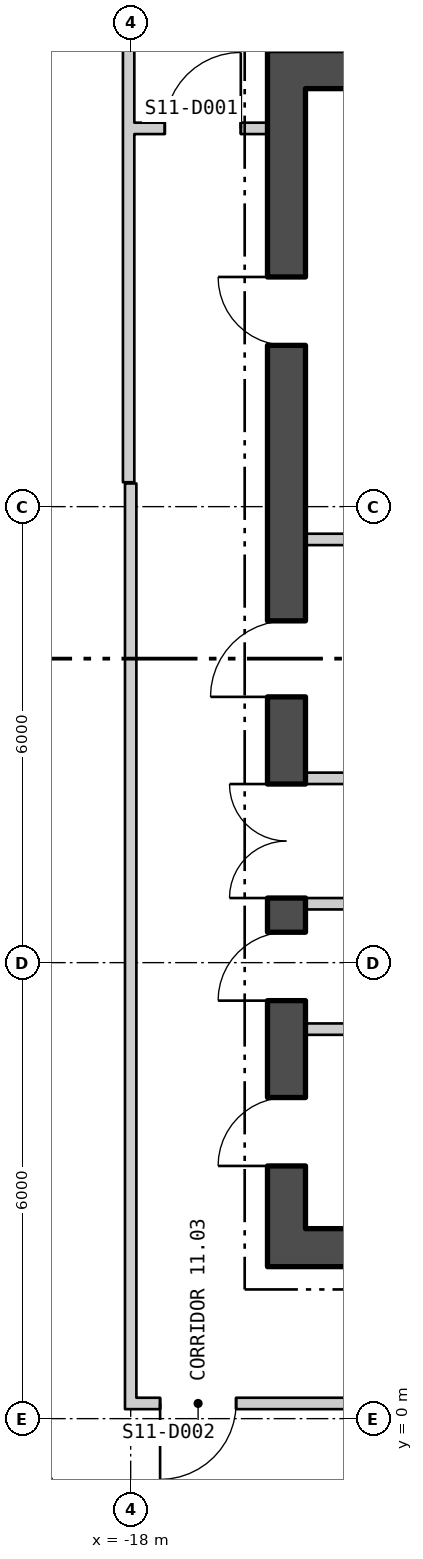
"""IFC4 building model, lengths in metres.
Left out: names, types, materials, properties, quantities, classifications, styles, units other than length and angle.
Written with IfcOpenShell. Run it as: python <this file> out.ifc"""

import sys

from ifc_helpers import new_model, si_unit, direction, frame, frame_2d, origin, place, context, subcontext, project, spatial, polyline, rectangle, outline, extrude, element, fill, save


model = new_model("IFC4")
c1 = context("Model", 3, precision=1e-05, world=origin(), true_north=direction((0.0, 1.0)))
c2 = subcontext(c1, "Body", "Model", "MODEL_VIEW")
j1 = project(units=[si_unit("LENGTHUNIT", "METRE"), si_unit("PLANEANGLEUNIT", "RADIAN")], contexts=[c1])
p1 = place(None, origin())
s1 = spatial("IfcSite", under=j1, at=p1, CompositionType="ELEMENT")
p2 = place(p1, origin())
s2 = spatial("IfcBuilding", under=s1, at=p2, CompositionType="ELEMENT")
p3 = place(p2, frame((0.0, 0.0, 151.5)))
s3 = spatial("IfcBuildingStorey", under=s2, at=p3, CompositionType="ELEMENT", Elevation=151.5)
p4 = place(p3, frame((-27.075, 12.683, -0.18), z_axis=(0.0, 0.0, 1.0), x_axis=(0.500000141277, -0.866025322218, 0.0)))
e1 = element("IfcWall", 1, at=p4, inside=s3, PredefinedType="SOLIDWALL", context=c2, shape_type="SweptSolid", body=[
    extrude(outline(polyline([(-0.13, -0.225), (45.86, -0.225), (45.6, 0.225), (0.13, 0.225), (-0.13, -0.225)])), origin(), (0.0, 0.0, 1.0), 3.68),
])
p5 = place(p4, frame((1.424, 0.0, 1.08)))
e2 = element("IfcOpeningElement", 2, at=p5, cuts=e1, PredefinedType="OPENING", context=c2, shape_type="SweptSolid", body=[
    extrude(rectangle(XDim=2.4, YDim=2.0, at=frame_2d((1.2, 1.0))), frame((0.0, 0.235, 0.0), z_axis=(0.0, -1.0, 0.0), x_axis=(1.0, 0.0, 0.0)), (0.0, 0.0, 1.0), 0.47),
])
p6 = place(p4, frame((5.892, 0.0, 1.08)))
e3 = element("IfcOpeningElement", 3, at=p6, cuts=e1, PredefinedType="OPENING", context=c2, shape_type="SweptSolid", body=[
    extrude(rectangle(XDim=2.4, YDim=2.0, at=frame_2d((1.2, 1.0))), frame((0.0, 0.235, 0.0), z_axis=(0.0, -1.0, 0.0), x_axis=(1.0, 0.0, 0.0)), (0.0, 0.0, 1.0), 0.47),
])
p7 = place(p4, frame((10.399, 0.0, 1.08)))
e4 = element("IfcOpeningElement", 4, at=p7, cuts=e1, PredefinedType="OPENING", context=c2, shape_type="SweptSolid", body=[
    extrude(rectangle(XDim=2.4, YDim=2.0, at=frame_2d((1.2, 1.0))), frame((0.0, 0.235, 0.0), z_axis=(0.0, -1.0, 0.0), x_axis=(1.0, 0.0, 0.0)), (0.0, 0.0, 1.0), 0.47),
])
p8 = place(p4, frame((14.905, 0.0, 1.08)))
e5 = element("IfcOpeningElement", 5, at=p8, cuts=e1, PredefinedType="OPENING", context=c2, shape_type="SweptSolid", body=[
    extrude(rectangle(XDim=2.4, YDim=2.0, at=frame_2d((1.2, 1.0))), frame((0.0, 0.235, 0.0), z_axis=(0.0, -1.0, 0.0), x_axis=(1.0, 0.0, 0.0)), (0.0, 0.0, 1.0), 0.47),
])
p9 = place(p4, frame((19.412, 0.0, 1.08)))
e6 = element("IfcOpeningElement", 6, at=p9, cuts=e1, PredefinedType="OPENING", context=c2, shape_type="SweptSolid", body=[
    extrude(rectangle(XDim=2.4, YDim=2.0, at=frame_2d((1.2, 1.0))), frame((0.0, 0.235, 0.0), z_axis=(0.0, -1.0, 0.0), x_axis=(1.0, 0.0, 0.0)), (0.0, 0.0, 1.0), 0.47),
])
p10 = place(p4, frame((23.918, 0.0, 1.08)))
e7 = element("IfcOpeningElement", 7, at=p10, cuts=e1, PredefinedType="OPENING", context=c2, shape_type="SweptSolid", body=[
    extrude(rectangle(XDim=2.4, YDim=2.0, at=frame_2d((1.2, 1.0))), frame((0.0, 0.235, 0.0), z_axis=(0.0, -1.0, 0.0), x_axis=(1.0, 0.0, 0.0)), (0.0, 0.0, 1.0), 0.47),
])
p11 = place(p4, frame((28.425, 0.0, 1.08)))
e8 = element("IfcOpeningElement", 8, at=p11, cuts=e1, PredefinedType="OPENING", context=c2, shape_type="SweptSolid", body=[
    extrude(rectangle(XDim=2.4, YDim=2.0, at=frame_2d((1.2, 1.0))), frame((0.0, 0.235, 0.0), z_axis=(0.0, -1.0, 0.0), x_axis=(1.0, 0.0, 0.0)), (0.0, 0.0, 1.0), 0.47),
])
p12 = place(p4, frame((32.932, 0.0, 1.08)))
e9 = element("IfcOpeningElement", 9, at=p12, cuts=e1, PredefinedType="OPENING", context=c2, shape_type="SweptSolid", body=[
    extrude(rectangle(XDim=2.4, YDim=2.0, at=frame_2d((1.2, 1.0))), frame((0.0, 0.235, 0.0), z_axis=(0.0, -1.0, 0.0), x_axis=(1.0, 0.0, 0.0)), (0.0, 0.0, 1.0), 0.47),
])
p13 = place(p4, frame((37.438, 0.0, 1.08)))
e10 = element("IfcOpeningElement", 10, at=p13, cuts=e1, PredefinedType="OPENING", context=c2, shape_type="SweptSolid", body=[
    extrude(rectangle(XDim=2.4, YDim=2.0, at=frame_2d((1.2, 1.0))), frame((0.0, 0.235, 0.0), z_axis=(0.0, -1.0, 0.0), x_axis=(1.0, 0.0, 0.0)), (0.0, 0.0, 1.0), 0.47),
])
p14 = place(p4, frame((41.907, 0.0, 1.08)))
e11 = element("IfcOpeningElement", 11, at=p14, cuts=e1, PredefinedType="OPENING", context=c2, shape_type="SweptSolid", body=[
    extrude(rectangle(XDim=2.4, YDim=2.0, at=frame_2d((1.2, 1.0))), frame((0.0, 0.235, 0.0), z_axis=(0.0, -1.0, 0.0), x_axis=(1.0, 0.0, 0.0)), (0.0, 0.0, 1.0), 0.47),
])
p15 = place(p3, frame((-16.2, 2.25, 0.0), z_axis=(0.0, 0.0, 1.0), x_axis=(1.0, 0.0, 0.0)))
e12 = element("IfcWall", 12, at=p15, inside=s3, PredefinedType="SHEAR", context=c2, shape_type="SweptSolid", body=[
    extrude(rectangle(XDim=32.4, YDim=0.5, at=frame_2d((16.2, 0.0))), origin(), (0.0, 0.0, 1.0), 3.7),
])
p16 = place(p15, frame((10.7, 0.0, 0.0)))
e13 = element("IfcOpeningElement", 13, at=p16, cuts=e12, PredefinedType="OPENING", context=c2, shape_type="SweptSolid", body=[
    extrude(rectangle(XDim=1.8, YDim=2.4, at=frame_2d((0.9, 1.2))), frame((0.0, 0.26, 0.0), z_axis=(0.0, -1.0, 0.0), x_axis=(1.0, 0.0, 0.0)), (0.0, 0.0, 1.0), 0.52),
])
p17 = place(p15, frame((20.7, 0.0, 0.0)))
e14 = element("IfcOpeningElement", 14, at=p17, cuts=e12, PredefinedType="OPENING", context=c2, shape_type="SweptSolid", body=[
    extrude(rectangle(XDim=1.8, YDim=2.4, at=frame_2d((0.9, 1.2))), frame((0.0, 0.26, 0.0), z_axis=(0.0, -1.0, 0.0), x_axis=(1.0, 0.0, 0.0)), (0.0, 0.0, 1.0), 0.52),
])
p18 = place(p3, frame((-16.2, 17.75, 0.0), z_axis=(0.0, 0.0, 1.0), x_axis=(1.0, 0.0, 0.0)))
e15 = element("IfcWall", 15, at=p18, inside=s3, PredefinedType="SHEAR", context=c2, shape_type="SweptSolid", body=[
    extrude(rectangle(XDim=32.4, YDim=0.5, at=frame_2d((16.2, 0.0))), origin(), (0.0, 0.0, 1.0), 3.7),
])
p19 = place(p3, frame((-15.95, 2.5, 0.0), z_axis=(0.0, 0.0, 1.0), x_axis=(0.0, 1.0, 0.0)))
e16 = element("IfcWall", 16, at=p19, inside=s3, PredefinedType="SHEAR", context=c2, shape_type="SweptSolid", body=[
    extrude(rectangle(XDim=15.0, YDim=0.5, at=frame_2d((7.5, 0.0))), origin(), (0.0, 0.0, 1.0), 3.7),
])
p20 = place(p19, frame((4.35, 0.0, 0.0)))
e17 = element("IfcOpeningElement", 17, at=p20, cuts=e16, PredefinedType="OPENING", context=c2, shape_type="SweptSolid", body=[
    extrude(rectangle(XDim=1.5, YDim=2.1, at=frame_2d((0.75, 1.05))), frame((0.0, 0.26, 0.0), z_axis=(0.0, -1.0, 0.0), x_axis=(1.0, 0.0, 0.0)), (0.0, 0.0, 1.0), 0.52),
])
p21 = place(p19, frame((0.825, 0.0, 0.0)))
e18 = element("IfcOpeningElement", 18, at=p21, cuts=e16, PredefinedType="OPENING", context=c2, shape_type="SweptSolid", body=[
    extrude(rectangle(XDim=0.9, YDim=2.1, at=frame_2d((0.45, 1.05))), frame((0.0, 0.26, 0.0), z_axis=(0.0, -1.0, 0.0), x_axis=(1.0, 0.0, 0.0)), (0.0, 0.0, 1.0), 0.52),
])
p22 = place(p19, frame((3.0, 0.0, 0.0)))
e19 = element("IfcOpeningElement", 19, at=p22, cuts=e16, PredefinedType="OPENING", context=c2, shape_type="SweptSolid", body=[
    extrude(rectangle(XDim=0.9, YDim=2.1, at=frame_2d((0.45, 1.05))), frame((0.0, 0.26, 0.0), z_axis=(0.0, -1.0, 0.0), x_axis=(1.0, 0.0, 0.0)), (0.0, 0.0, 1.0), 0.52),
])
p23 = place(p19, frame((6.997, 0.0, 0.0)))
e20 = element("IfcOpeningElement", 20, at=p23, cuts=e16, PredefinedType="OPENING", context=c2, shape_type="SweptSolid", body=[
    extrude(rectangle(XDim=1.0, YDim=2.1, at=frame_2d((0.5, 1.05))), frame((0.0, 0.26, 0.0), z_axis=(0.0, -1.0, 0.0), x_axis=(1.0, 0.0, 0.0)), (0.0, 0.0, 1.0), 0.52),
])
p24 = place(p19, frame((11.622, 0.0, 0.0)))
e21 = element("IfcOpeningElement", 21, at=p24, cuts=e16, PredefinedType="OPENING", context=c2, shape_type="SweptSolid", body=[
    extrude(rectangle(XDim=0.9, YDim=2.1, at=frame_2d((0.45, 1.05))), frame((0.0, 0.26, 0.0), z_axis=(0.0, -1.0, 0.0), x_axis=(1.0, 0.0, 0.0)), (0.0, 0.0, 1.0), 0.52),
])
for number, where, z_axis, x_axis in (
    (22, (-15.7, 6.775, 0.0), (0.0, 0.0, 1.0), (1.0, 0.0, 0.0)),
    (23, (-15.7, 8.425, 0.0), (0.0, 0.0, 1.0), (1.0, 0.0, 0.0)),
    (24, (-15.7, 5.125, 0.0), (0.0, 0.0, 1.0), (1.0, 0.0, 0.0)),
    (25, (-15.7, 11.569, 0.0), (0.0, 0.0, 1.0), (1.0, 0.0, 0.0)),
):
    element("IfcWall", number, at=place(p3, frame(where, z_axis=z_axis, x_axis=x_axis)), inside=s3, PredefinedType="PARTITIONING", context=c2, shape_type="SweptSolid", body=[
        extrude(rectangle(XDim=1.2, YDim=0.15, at=frame_2d((0.6, 0.0))), origin(), (0.0, 0.0, 1.0), 3.7),
    ])
p25 = place(p3, frame((-18.027, 12.321, 0.0), z_axis=(0.0, 0.0, 1.0), x_axis=(0.0, 1.0, 0.0)))
e26 = element("IfcWall", 26, at=p25, inside=s3, PredefinedType="PARTITIONING", context=c2, shape_type="SweptSolid", body=[
    extrude(rectangle(XDim=6.979, YDim=0.15, at=frame_2d((3.49, 0.0))), origin(), (0.0, 0.0, 1.0), 3.7),
])
p26 = place(p3, frame((-18.0, 0.125, 0.0), z_axis=(0.0, 0.0, 1.0), x_axis=(0.0, 1.0, 0.0)))
e27 = element("IfcWall", 27, at=p26, inside=s3, PredefinedType="PARTITIONING", context=c2, shape_type="SweptSolid", body=[
    extrude(rectangle(XDim=12.18, YDim=0.15, at=frame_2d((6.09, 0.0))), origin(), (0.0, 0.0, 1.0), 3.7),
])
p27 = place(p3, frame((-17.952, 16.977, 0.0), z_axis=(0.0, 0.0, 1.0), x_axis=(1.0, 0.0, 0.0)))
e28 = element("IfcWall", 28, at=p27, inside=s3, PredefinedType="PARTITIONING", context=c2, shape_type="SweptSolid", body=[
    extrude(rectangle(XDim=1.752, YDim=0.15, at=frame_2d((0.876, 0.0))), origin(), (0.0, 0.0, 1.0), 3.7),
])
p28 = place(p27, frame((0.401, 0.0, 0.0)))
e29 = element("IfcOpeningElement", 29, at=p28, cuts=e28, PredefinedType="OPENING", context=c2, shape_type="SweptSolid", body=[
    extrude(rectangle(XDim=1.0, YDim=2.1, at=frame_2d((0.5, 1.05))), frame((0.0, 0.085, 0.0), z_axis=(0.0, -1.0, 0.0), x_axis=(1.0, 0.0, 0.0)), (0.0, 0.0, 1.0), 0.17),
])
p29 = place(p3, frame((-17.925, 0.2, 0.0), z_axis=(0.0, 0.0, 1.0), x_axis=(1.0, 0.0, 0.0)))
e30 = element("IfcWall", 30, at=p29, inside=s3, PredefinedType="PARTITIONING", context=c2, shape_type="SweptSolid", body=[
    extrude(rectangle(XDim=10.68, YDim=0.15, at=frame_2d((5.34, 0.0))), origin(), (0.0, 0.0, 1.0), 3.7),
])
p30 = place(p29, frame((0.312, 0.0, 0.0)))
e31 = element("IfcOpeningElement", 31, at=p30, cuts=e30, PredefinedType="OPENING", context=c2, shape_type="SweptSolid", body=[
    extrude(rectangle(XDim=1.0, YDim=2.1, at=frame_2d((0.5, 1.05))), frame((0.0, 0.085, 0.0), z_axis=(0.0, -1.0, 0.0), x_axis=(1.0, 0.0, 0.0)), (0.0, 0.0, 1.0), 0.17),
])
p31 = place(p8, origin())
e32 = element("IfcWindow", 32, at=p31, inside=s3, PartitioningType="SINGLE_PANEL", PredefinedType="WINDOW", context=c2, shape_type="SweptSolid", body=[
    extrude(rectangle(XDim=2.4, YDim=2.0, at=frame_2d((1.2, 1.0))), frame((0.0, 0.105, 0.0), z_axis=(0.0, -1.0, 0.0), x_axis=(1.0, 0.0, 0.0)), (0.0, 0.0, 1.0), 0.06),
])
fill(e5, e32)
p32 = place(p20, origin())
e33 = element("IfcDoor", 33, at=p32, inside=s3, OperationType="DOUBLE_DOOR_SINGLE_SWING", PredefinedType="DOOR", context=c2, shape_type="SweptSolid", body=[
    extrude(rectangle(XDim=1.5, YDim=2.1, at=frame_2d((0.75, 1.05))), frame((0.0, 0.025, 0.0), z_axis=(0.0, -1.0, 0.0), x_axis=(1.0, 0.0, 0.0)), (0.0, 0.0, 1.0), 0.05),
])
fill(e17, e33)
p33 = place(p21, origin())
e34 = element("IfcDoor", 34, at=p33, inside=s3, OperationType="SINGLE_SWING_RIGHT", PredefinedType="DOOR", context=c2, shape_type="SweptSolid", body=[
    extrude(rectangle(XDim=0.9, YDim=2.1, at=frame_2d((0.45, 1.05))), frame((0.0, 0.025, 0.0), z_axis=(0.0, -1.0, 0.0), x_axis=(1.0, 0.0, 0.0)), (0.0, 0.0, 1.0), 0.05),
])
fill(e18, e34)
p34 = place(p22, origin())
e35 = element("IfcDoor", 35, at=p34, inside=s3, OperationType="SINGLE_SWING_RIGHT", PredefinedType="DOOR", context=c2, shape_type="SweptSolid", body=[
    extrude(rectangle(XDim=0.9, YDim=2.1, at=frame_2d((0.45, 1.05))), frame((0.0, 0.025, 0.0), z_axis=(0.0, -1.0, 0.0), x_axis=(1.0, 0.0, 0.0)), (0.0, 0.0, 1.0), 0.05),
])
fill(e19, e35)
p35 = place(p23, origin())
e36 = element("IfcDoor", 36, at=p35, inside=s3, OperationType="SINGLE_SWING_RIGHT", PredefinedType="DOOR", context=c2, shape_type="SweptSolid", body=[
    extrude(rectangle(XDim=1.0, YDim=2.1, at=frame_2d((0.5, 1.05))), frame((0.0, 0.025, 0.0), z_axis=(0.0, -1.0, 0.0), x_axis=(1.0, 0.0, 0.0)), (0.0, 0.0, 1.0), 0.05),
])
fill(e20, e36)
p36 = place(p24, origin())
e37 = element("IfcDoor", 37, at=p36, inside=s3, OperationType="SINGLE_SWING_LEFT", PredefinedType="DOOR", context=c2, shape_type="SweptSolid", body=[
    extrude(rectangle(XDim=0.9, YDim=2.1, at=frame_2d((0.45, 1.05))), frame((0.0, 0.025, 0.0), z_axis=(0.0, -1.0, 0.0), x_axis=(1.0, 0.0, 0.0)), (0.0, 0.0, 1.0), 0.05),
])
fill(e21, e37)
p37 = place(p28, origin())
e38 = element("IfcDoor", 38, at=p37, inside=s3, OperationType="SINGLE_SWING_LEFT", PredefinedType="DOOR", context=c2, shape_type="SweptSolid", body=[
    extrude(rectangle(XDim=1.0, YDim=2.1, at=frame_2d((0.5, 1.05))), frame((0.0, 0.025, 0.0), z_axis=(0.0, -1.0, 0.0), x_axis=(1.0, 0.0, 0.0)), (0.0, 0.0, 1.0), 0.05),
])
fill(e29, e38)
p38 = place(p30, origin())
e39 = element("IfcDoor", 39, at=p38, inside=s3, OperationType="SINGLE_SWING_LEFT", PredefinedType="DOOR", context=c2, shape_type="SweptSolid", body=[
    extrude(rectangle(XDim=1.0, YDim=2.1, at=frame_2d((0.5, 1.05))), frame((0.0, 0.025, 0.0), z_axis=(0.0, -1.0, 0.0), x_axis=(1.0, 0.0, 0.0)), (0.0, 0.0, 1.0), 0.05),
])
fill(e31, e39)
save(model, sys.argv[1])
